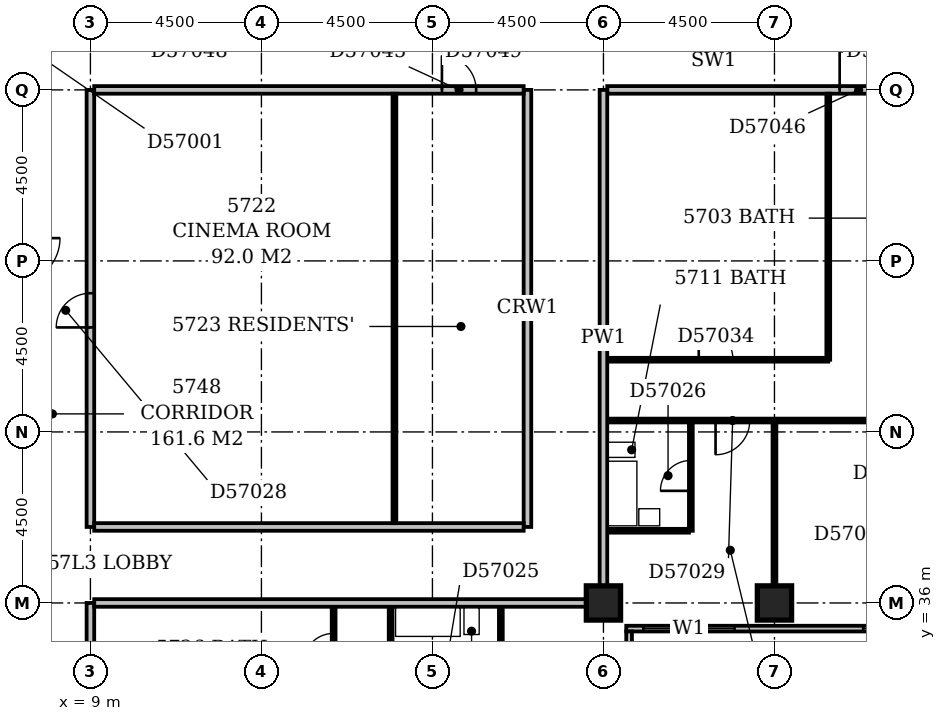
"""IFC4 building model, lengths in metres.
Left out: names, types, materials, properties, quantities, classifications, styles, units other than length and angle.
Written with IfcOpenShell. Run it as: python <this file> out.ifc"""

import sys

from ifc_helpers import new_model, si_unit, direction, frame, frame_2d, origin, origin_2d, place, context, subcontext, project, spatial, rectangle, extrude, element, fill, save


model = new_model("IFC4")
c1 = context("Model", 3, precision=1e-05, world=origin(), true_north=direction((0.0, 1.0)))
c2 = subcontext(c1, "Body", "Model", "MODEL_VIEW")
j1 = project(units=[si_unit("LENGTHUNIT", "METRE"), si_unit("PLANEANGLEUNIT", "RADIAN")], contexts=[c1])
p1 = place(None, origin())
s1 = spatial("IfcSite", under=j1, at=p1, CompositionType="ELEMENT")
p2 = place(p1, origin())
s2 = spatial("IfcBuilding", under=s1, at=p2, CompositionType="ELEMENT")
p3 = place(p2, frame((0.0, 0.0, 222.2)))
s3 = spatial("IfcBuildingStorey", under=s2, at=p3, CompositionType="ELEMENT", Elevation=222.2)
for number, where, z_axis, x_axis in (
    (1, (22.5, 36.0, -0.3), (0.0, 0.0, 1.0), (1.0, 0.0, 0.0)),
    (2, (27.0, 36.0, -0.3), (0.0, 0.0, 1.0), (1.0, 0.0, 0.0)),
):
    element("IfcColumn", number, at=place(p3, frame(where, z_axis=z_axis, x_axis=x_axis)), inside=s3, PredefinedType="COLUMN", context=c2, shape_type="SweptSolid", body=[
        extrude(rectangle(XDim=0.9, YDim=0.9, at=origin_2d()), origin(), (0.0, 0.0, 1.0), 3.6),
    ])
p4 = place(p3, frame((23.175, 17.4, 0.0), z_axis=(0.0, 0.0, 1.0), x_axis=(0.0, 1.0, 0.0)))
e3 = element("IfcWall", 3, at=p4, inside=s3, PredefinedType="STANDARD", context=c2, shape_type="SweptSolid", body=[
    extrude(rectangle(XDim=17.85, YDim=0.15, at=frame_2d((8.925, 0.0))), origin(), (0.0, 0.0, 1.0), 2.7),
])
p5 = place(p4, frame((1.65, 0.0, 0.6)))
e4 = element("IfcOpeningElement", 4, at=p5, cuts=e3, PredefinedType="OPENING", context=c2, shape_type="SweptSolid", body=[
    extrude(rectangle(XDim=2.4, YDim=1.8, at=frame_2d((1.2, 0.9))), frame((0.0, 0.087, 0.0), z_axis=(0.0, -1.0, 0.0), x_axis=(1.0, 0.0, 0.0)), (0.0, 0.0, 1.0), 0.174),
])
p6 = place(p4, frame((5.798, 0.0, 0.6)))
e5 = element("IfcOpeningElement", 5, at=p6, cuts=e3, PredefinedType="OPENING", context=c2, shape_type="SweptSolid", body=[
    extrude(rectangle(XDim=0.6, YDim=1.8, at=frame_2d((0.3, 0.9))), frame((0.0, 0.087, 0.0), z_axis=(0.0, -1.0, 0.0), x_axis=(1.0, 0.0, 0.0)), (0.0, 0.0, 1.0), 0.174),
])
p7 = place(p4, frame((8.491, 0.0, 0.6)))
e6 = element("IfcOpeningElement", 6, at=p7, cuts=e3, PredefinedType="OPENING", context=c2, shape_type="SweptSolid", body=[
    extrude(rectangle(XDim=0.45, YDim=1.8, at=frame_2d((0.225, 0.9))), frame((0.0, 0.087, 0.0), z_axis=(0.0, -1.0, 0.0), x_axis=(1.0, 0.0, 0.0)), (0.0, 0.0, 1.0), 0.174),
])
p8 = place(p4, frame((10.65, 0.0, 0.6)))
e7 = element("IfcOpeningElement", 7, at=p8, cuts=e3, PredefinedType="OPENING", context=c2, shape_type="SweptSolid", body=[
    extrude(rectangle(XDim=2.4, YDim=1.8, at=frame_2d((1.2, 0.9))), frame((0.0, 0.087, 0.0), z_axis=(0.0, -1.0, 0.0), x_axis=(1.0, 0.0, 0.0)), (0.0, 0.0, 1.0), 0.174),
])
p9 = place(p4, frame((15.15, 0.0, 0.6)))
e8 = element("IfcOpeningElement", 8, at=p9, cuts=e3, PredefinedType="OPENING", context=c2, shape_type="SweptSolid", body=[
    extrude(rectangle(XDim=2.4, YDim=1.8, at=frame_2d((1.2, 0.9))), frame((0.0, 0.087, 0.0), z_axis=(0.0, -1.0, 0.0), x_axis=(1.0, 0.0, 0.0)), (0.0, 0.0, 1.0), 0.174),
])
p10 = place(p3, frame((23.1, 35.325, 0.0), z_axis=(0.0, 0.0, 1.0), x_axis=(1.0, 0.0, 0.0)))
e9 = element("IfcWall", 9, at=p10, inside=s3, PredefinedType="STANDARD", context=c2, shape_type="SweptSolid", body=[
    extrude(rectangle(XDim=27.15, YDim=0.15, at=frame_2d((13.575, 0.0))), origin(), (0.0, 0.0, 1.0), 2.7),
])
p11 = place(p10, frame((0.45, 0.0, 0.6)))
e10 = element("IfcOpeningElement", 10, at=p11, cuts=e9, PredefinedType="OPENING", context=c2, shape_type="SweptSolid", body=[
    extrude(rectangle(XDim=2.4, YDim=1.8, at=frame_2d((1.2, 0.9))), frame((0.0, 0.087, 0.0), z_axis=(0.0, -1.0, 0.0), x_axis=(1.0, 0.0, 0.0)), (0.0, 0.0, 1.0), 0.174),
])
p12 = place(p10, frame((6.234, 0.0, 0.6)))
e11 = element("IfcOpeningElement", 11, at=p12, cuts=e9, PredefinedType="OPENING", context=c2, shape_type="SweptSolid", body=[
    extrude(rectangle(XDim=1.5, YDim=1.8, at=frame_2d((0.75, 0.9))), frame((0.0, 0.087, 0.0), z_axis=(0.0, -1.0, 0.0), x_axis=(1.0, 0.0, 0.0)), (0.0, 0.0, 1.0), 0.174),
])
p13 = place(p10, frame((9.45, 0.0, 0.6)))
e12 = element("IfcOpeningElement", 12, at=p13, cuts=e9, PredefinedType="OPENING", context=c2, shape_type="SweptSolid", body=[
    extrude(rectangle(XDim=2.4, YDim=1.8, at=frame_2d((1.2, 0.9))), frame((0.0, 0.087, 0.0), z_axis=(0.0, -1.0, 0.0), x_axis=(1.0, 0.0, 0.0)), (0.0, 0.0, 1.0), 0.174),
])
p14 = place(p10, frame((13.95, 0.0, 0.6)))
e13 = element("IfcOpeningElement", 13, at=p14, cuts=e9, PredefinedType="OPENING", context=c2, shape_type="SweptSolid", body=[
    extrude(rectangle(XDim=2.4, YDim=1.8, at=frame_2d((1.2, 0.9))), frame((0.0, 0.087, 0.0), z_axis=(0.0, -1.0, 0.0), x_axis=(1.0, 0.0, 0.0)), (0.0, 0.0, 1.0), 0.174),
])
p15 = place(p10, frame((18.18, 0.0, 0.6)))
e14 = element("IfcOpeningElement", 14, at=p15, cuts=e9, PredefinedType="OPENING", context=c2, shape_type="SweptSolid", body=[
    extrude(rectangle(XDim=1.8, YDim=1.8, at=frame_2d((0.9, 0.9))), frame((0.0, 0.087, 0.0), z_axis=(0.0, -1.0, 0.0), x_axis=(1.0, 0.0, 0.0)), (0.0, 0.0, 1.0), 0.174),
])
p16 = place(p10, frame((22.95, 0.0, 0.6)))
e15 = element("IfcOpeningElement", 15, at=p16, cuts=e9, PredefinedType="OPENING", context=c2, shape_type="SweptSolid", body=[
    extrude(rectangle(XDim=2.4, YDim=1.8, at=frame_2d((1.2, 0.9))), frame((0.0, 0.087, 0.0), z_axis=(0.0, -1.0, 0.0), x_axis=(1.0, 0.0, 0.0)), (0.0, 0.0, 1.0), 0.174),
])
p17 = place(p3, frame((9.0, 18.45, 0.0), z_axis=(0.0, 0.0, 1.0), x_axis=(0.0, 1.0, 0.0)))
e16 = element("IfcWall", 16, at=p17, inside=s3, PredefinedType="PARTITIONING", context=c2, shape_type="SweptSolid", body=[
    extrude(rectangle(XDim=17.55, YDim=0.2, at=frame_2d((8.775, 0.0))), origin(), (0.0, 0.0, 1.0), 3.3),
])
p18 = place(p17, frame((13.85, 0.0, 0.0)))
e17 = element("IfcOpeningElement", 17, at=p18, cuts=e16, PredefinedType="OPENING", context=c2, shape_type="SweptSolid", body=[
    extrude(rectangle(XDim=1.0, YDim=2.1, at=frame_2d((0.5, 1.05))), frame((0.0, 0.112, 0.0), z_axis=(0.0, -1.0, 0.0), x_axis=(1.0, 0.0, 0.0)), (0.0, 0.0, 1.0), 0.224),
])
p19 = place(p17, frame((3.25, 0.0, 0.0)))
e18 = element("IfcOpeningElement", 18, at=p19, cuts=e16, PredefinedType="OPENING", context=c2, shape_type="SweptSolid", body=[
    extrude(rectangle(XDim=1.0, YDim=2.1, at=frame_2d((0.5, 1.05))), frame((0.0, 0.112, 0.0), z_axis=(0.0, -1.0, 0.0), x_axis=(1.0, 0.0, 0.0)), (0.0, 0.0, 1.0), 0.224),
])
p20 = place(p3, frame((16.9, 27.1, 0.0), z_axis=(0.0, 0.0, 1.0), x_axis=(0.0, 1.0, 0.0)))
e19 = element("IfcWall", 19, at=p20, inside=s3, PredefinedType="PARTITIONING", context=c2, shape_type="SweptSolid", body=[
    extrude(rectangle(XDim=8.8, YDim=0.1, at=frame_2d((4.4, 0.0))), origin(), (0.0, 0.0, 1.0), 3.3),
])
p21 = place(p20, frame((1.7, 0.0, 0.0)))
e20 = element("IfcOpeningElement", 20, at=p21, cuts=e19, PredefinedType="OPENING", context=c2, shape_type="SweptSolid", body=[
    extrude(rectangle(XDim=0.9, YDim=2.1, at=frame_2d((0.45, 1.05))), frame((0.0, 0.062, 0.0), z_axis=(0.0, -1.0, 0.0), x_axis=(1.0, 0.0, 0.0)), (0.0, 0.0, 1.0), 0.124),
])
p22 = place(p20, frame((5.05, 0.0, 0.0)))
e21 = element("IfcOpeningElement", 21, at=p22, cuts=e19, PredefinedType="OPENING", context=c2, shape_type="SweptSolid", body=[
    extrude(rectangle(XDim=0.9, YDim=2.1, at=frame_2d((0.45, 1.05))), frame((0.0, 0.062, 0.0), z_axis=(0.0, -1.0, 0.0), x_axis=(1.0, 0.0, 0.0)), (0.0, 0.0, 1.0), 0.124),
])
p23 = place(p3, frame((15.4, 33.6, 0.0), z_axis=(0.0, 0.0, 1.0), x_axis=(0.0, 1.0, 0.0)))
e22 = element("IfcWall", 22, at=p23, inside=s3, PredefinedType="PARTITIONING", context=c2, shape_type="SweptSolid", body=[
    extrude(rectangle(XDim=2.3, YDim=0.1, at=frame_2d((1.15, 0.0))), origin(), (0.0, 0.0, 1.0), 3.3),
])
p24 = place(p23, frame((0.8, 0.0, 0.0)))
e23 = element("IfcOpeningElement", 23, at=p24, cuts=e22, PredefinedType="OPENING", context=c2, shape_type="SweptSolid", body=[
    extrude(rectangle(XDim=0.8, YDim=2.1, at=frame_2d((0.4, 1.05))), frame((0.0, 0.062, 0.0), z_axis=(0.0, -1.0, 0.0), x_axis=(1.0, 0.0, 0.0)), (0.0, 0.0, 1.0), 0.124),
])
p25 = place(p3, frame((19.8, 33.7, 0.0), z_axis=(0.0, 0.0, 1.0), x_axis=(0.0, 1.0, 0.0)))
e24 = element("IfcWall", 24, at=p25, inside=s3, PredefinedType="PLUMBINGWALL", context=c2, shape_type="SweptSolid", body=[
    extrude(rectangle(XDim=2.2, YDim=0.1, at=frame_2d((1.1, 0.0))), origin(), (0.0, 0.0, 1.0), 3.3),
])
p26 = place(p3, frame((9.1, 36.0, 0.0), z_axis=(0.0, 0.0, 1.0), x_axis=(1.0, 0.0, 0.0)))
e25 = element("IfcWall", 25, at=p26, inside=s3, PredefinedType="PARTITIONING", context=c2, shape_type="SweptSolid", body=[
    extrude(rectangle(XDim=12.95, YDim=0.2, at=frame_2d((6.475, 0.0))), origin(), (0.0, 0.0, 1.0), 3.3),
])
p27 = place(p3, frame((22.5, 36.45, 0.0), z_axis=(0.0, 0.0, 1.0), x_axis=(0.0, 1.0, 0.0)))
e26 = element("IfcWall", 26, at=p27, inside=s3, PredefinedType="PARTITIONING", context=c2, shape_type="SweptSolid", body=[
    extrude(rectangle(XDim=13.05, YDim=0.2, at=frame_2d((6.525, 0.0))), origin(), (0.0, 0.0, 1.0), 3.3),
])
p28 = place(p3, frame((27.0, 36.45, 0.0), z_axis=(0.0, 0.0, 1.0), x_axis=(0.0, 1.0, 0.0)))
e27 = element("IfcWall", 27, at=p28, inside=s3, PredefinedType="PARTITIONING", context=c2, shape_type="SweptSolid", body=[
    extrude(rectangle(XDim=4.3, YDim=0.1, at=frame_2d((2.15, 0.0))), origin(), (0.0, 0.0, 1.0), 2.4),
])
p29 = place(p3, frame((22.6, 37.9, 0.0), z_axis=(0.0, 0.0, 1.0), x_axis=(1.0, 0.0, 0.0)))
e28 = element("IfcWall", 28, at=p29, inside=s3, PredefinedType="PLUMBINGWALL", context=c2, shape_type="SweptSolid", body=[
    extrude(rectangle(XDim=2.15, YDim=0.1, at=frame_2d((1.075, 0.0))), origin(), (0.0, 0.0, 1.0), 3.3),
])
p30 = place(p3, frame((24.8, 37.9, 0.0), z_axis=(0.0, 0.0, 1.0), x_axis=(0.0, 1.0, 0.0)))
e29 = element("IfcWall", 29, at=p30, inside=s3, PredefinedType="PLUMBINGWALL", context=c2, shape_type="SweptSolid", body=[
    extrude(rectangle(XDim=2.85, YDim=0.1, at=frame_2d((1.425, 0.0))), origin(), (0.0, 0.0, 1.0), 3.3),
])
p31 = place(p30, frame((1.05, 0.0, 0.0)))
e30 = element("IfcOpeningElement", 30, at=p31, cuts=e29, PredefinedType="OPENING", context=c2, shape_type="SweptSolid", body=[
    extrude(rectangle(XDim=0.8, YDim=2.1, at=frame_2d((0.4, 1.05))), frame((0.0, 0.062, 0.0), z_axis=(0.0, -1.0, 0.0), x_axis=(1.0, 0.0, 0.0)), (0.0, 0.0, 1.0), 0.124),
])
p32 = place(p3, frame((9.0, 38.0, 0.0), z_axis=(0.0, 0.0, 1.0), x_axis=(0.0, 1.0, 0.0)))
e31 = element("IfcWall", 31, at=p32, inside=s3, PredefinedType="PARTITIONING", context=c2, shape_type="SweptSolid", body=[
    extrude(rectangle(XDim=11.5, YDim=0.2, at=frame_2d((5.75, 0.0))), origin(), (0.0, 0.0, 1.0), 3.3),
])
p33 = place(p32, frame((5.25, 0.0, 0.0)))
e32 = element("IfcOpeningElement", 32, at=p33, cuts=e31, PredefinedType="OPENING", context=c2, shape_type="SweptSolid", body=[
    extrude(rectangle(XDim=0.9, YDim=2.1, at=frame_2d((0.45, 1.05))), frame((0.0, 0.112, 0.0), z_axis=(0.0, -1.0, 0.0), x_axis=(1.0, 0.0, 0.0)), (0.0, 0.0, 1.0), 0.224),
])
p34 = place(p3, frame((9.1, 38.0, 0.0), z_axis=(0.0, 0.0, 1.0), x_axis=(1.0, 0.0, 0.0)))
e33 = element("IfcWall", 33, at=p34, inside=s3, PredefinedType="PARTITIONING", context=c2, shape_type="SweptSolid", body=[
    extrude(rectangle(XDim=11.3, YDim=0.2, at=frame_2d((5.65, 0.0))), origin(), (0.0, 0.0, 1.0), 3.3),
])
p35 = place(p3, frame((20.5, 38.0, 0.0), z_axis=(0.0, 0.0, 1.0), x_axis=(0.0, 1.0, 0.0)))
e34 = element("IfcWall", 34, at=p35, inside=s3, PredefinedType="PARTITIONING", context=c2, shape_type="SweptSolid", body=[
    extrude(rectangle(XDim=11.5, YDim=0.2, at=frame_2d((5.75, 0.0))), origin(), (0.0, 0.0, 1.0), 3.3),
])
p36 = place(p3, frame((17.0, 38.1, 0.0), z_axis=(0.0, 0.0, 1.0), x_axis=(0.0, 1.0, 0.0)))
e35 = element("IfcWall", 35, at=p36, inside=s3, PredefinedType="PARTITIONING", context=c2, shape_type="SweptSolid", body=[
    extrude(rectangle(XDim=11.3, YDim=0.1, at=frame_2d((5.65, 0.0))), origin(), (0.0, 0.0, 1.0), 3.3),
])
p37 = place(p3, frame((22.6, 40.8, 0.0), z_axis=(0.0, 0.0, 1.0), x_axis=(1.0, 0.0, 0.0)))
e36 = element("IfcWall", 36, at=p37, inside=s3, PredefinedType="PARTITIONING", context=c2, shape_type="SweptSolid", body=[
    extrude(rectangle(XDim=22.3, YDim=0.1, at=frame_2d((11.15, 0.0))), origin(), (0.0, 0.0, 1.0), 3.3),
])
p38 = place(p37, frame((2.85, 0.0, 0.0)))
e37 = element("IfcOpeningElement", 37, at=p38, cuts=e36, PredefinedType="OPENING", context=c2, shape_type="SweptSolid", body=[
    extrude(rectangle(XDim=0.9, YDim=2.1, at=frame_2d((0.45, 1.05))), frame((0.0, 0.062, 0.0), z_axis=(0.0, -1.0, 0.0), x_axis=(1.0, 0.0, 0.0)), (0.0, 0.0, 1.0), 0.124),
])
p39 = place(p37, frame((8.4, 0.0, 0.0)))
e38 = element("IfcOpeningElement", 38, at=p39, cuts=e36, PredefinedType="OPENING", context=c2, shape_type="SweptSolid", body=[
    extrude(rectangle(XDim=0.9, YDim=2.1, at=frame_2d((0.45, 1.05))), frame((0.0, 0.062, 0.0), z_axis=(0.0, -1.0, 0.0), x_axis=(1.0, 0.0, 0.0)), (0.0, 0.0, 1.0), 0.124),
])
p40 = place(p37, frame((14.05, 0.0, 0.0)))
e39 = element("IfcOpeningElement", 39, at=p40, cuts=e36, PredefinedType="OPENING", context=c2, shape_type="SweptSolid", body=[
    extrude(rectangle(XDim=0.9, YDim=2.1, at=frame_2d((0.45, 1.05))), frame((0.0, 0.062, 0.0), z_axis=(0.0, -1.0, 0.0), x_axis=(1.0, 0.0, 0.0)), (0.0, 0.0, 1.0), 0.124),
])
p41 = place(p37, frame((19.7, 0.0, 0.0)))
e40 = element("IfcOpeningElement", 40, at=p41, cuts=e36, PredefinedType="OPENING", context=c2, shape_type="SweptSolid", body=[
    extrude(rectangle(XDim=0.9, YDim=2.1, at=frame_2d((0.45, 1.05))), frame((0.0, 0.062, 0.0), z_axis=(0.0, -1.0, 0.0), x_axis=(1.0, 0.0, 0.0)), (0.0, 0.0, 1.0), 0.124),
])
p42 = place(p3, frame((22.6, 42.4, 0.0), z_axis=(0.0, 0.0, 1.0), x_axis=(1.0, 0.0, 0.0)))
e41 = element("IfcWall", 41, at=p42, inside=s3, PredefinedType="PARTITIONING", context=c2, shape_type="SweptSolid", body=[
    extrude(rectangle(XDim=5.815, YDim=0.1, at=frame_2d((2.908, 0.0))), origin(), (0.0, 0.0, 1.0), 3.3),
])
p43 = place(p42, frame((2.408, 0.0, 0.0)))
e42 = element("IfcOpeningElement", 42, at=p43, cuts=e41, PredefinedType="OPENING", context=c2, shape_type="SweptSolid", body=[
    extrude(rectangle(XDim=0.9, YDim=2.1, at=frame_2d((0.45, 1.05))), frame((0.0, 0.062, 0.0), z_axis=(0.0, -1.0, 0.0), x_axis=(1.0, 0.0, 0.0)), (0.0, 0.0, 1.0), 0.124),
])
p44 = place(p3, frame((28.416, 42.4, 0.0), z_axis=(0.0, 0.0, 1.0), x_axis=(0.0, 1.0, 0.0)))
e43 = element("IfcWall", 43, at=p44, inside=s3, PredefinedType="PARTITIONING", context=c2, shape_type="SweptSolid", body=[
    extrude(rectangle(XDim=7.0, YDim=0.1, at=frame_2d((3.5, 0.0))), origin(), (0.0, 0.0, 1.0), 3.3),
])
p45 = place(p3, frame((9.1, 49.5, 0.0), z_axis=(0.0, 0.0, 1.0), x_axis=(1.0, 0.0, 0.0)))
e44 = element("IfcWall", 44, at=p45, inside=s3, PredefinedType="PARTITIONING", context=c2, shape_type="SweptSolid", body=[
    extrude(rectangle(XDim=11.3, YDim=0.2, at=frame_2d((5.65, 0.0))), origin(), (0.0, 0.0, 1.0), 3.3),
])
p46 = place(p45, frame((9.15, 0.0, 0.0)))
e45 = element("IfcOpeningElement", 45, at=p46, cuts=e44, PredefinedType="OPENING", context=c2, shape_type="SweptSolid", body=[
    extrude(rectangle(XDim=0.9, YDim=2.1, at=frame_2d((0.45, 1.05))), frame((0.0, 0.112, 0.0), z_axis=(0.0, -1.0, 0.0), x_axis=(1.0, 0.0, 0.0)), (0.0, 0.0, 1.0), 0.224),
])
p47 = place(p3, frame((22.6, 49.5, 0.0), z_axis=(0.0, 0.0, 1.0), x_axis=(1.0, 0.0, 0.0)))
e46 = element("IfcWall", 46, at=p47, inside=s3, PredefinedType="PARTITIONING", context=c2, shape_type="SweptSolid", body=[
    extrude(rectangle(XDim=30.95, YDim=0.2, at=frame_2d((15.475, 0.0))), origin(), (0.0, 0.0, 1.0), 3.3),
])
p48 = place(p47, frame((6.115, 0.0, 0.0)))
e47 = element("IfcOpeningElement", 47, at=p48, cuts=e46, PredefinedType="OPENING", context=c2, shape_type="SweptSolid", body=[
    extrude(rectangle(XDim=1.0, YDim=2.1, at=frame_2d((0.5, 1.05))), frame((0.0, 0.112, 0.0), z_axis=(0.0, -1.0, 0.0), x_axis=(1.0, 0.0, 0.0)), (0.0, 0.0, 1.0), 0.224),
])
p49 = place(p47, frame((22.7, 0.0, 0.0)))
e48 = element("IfcOpeningElement", 48, at=p49, cuts=e46, PredefinedType="OPENING", context=c2, shape_type="SweptSolid", body=[
    extrude(rectangle(XDim=1.0, YDim=2.1, at=frame_2d((0.5, 1.05))), frame((0.0, 0.112, 0.0), z_axis=(0.0, -1.0, 0.0), x_axis=(1.0, 0.0, 0.0)), (0.0, 0.0, 1.0), 0.224),
])
p50 = place(p11, origin())
e49 = element("IfcWindow", 49, at=p50, inside=s3, PartitioningType="SINGLE_PANEL", PredefinedType="WINDOW", context=c2, shape_type="SweptSolid", body=[
    extrude(rectangle(XDim=2.4, YDim=1.8, at=frame_2d((1.2, 0.9))), frame((0.0, 0.03, 0.0), z_axis=(0.0, -1.0, 0.0), x_axis=(1.0, 0.0, 0.0)), (0.0, 0.0, 1.0), 0.06),
])
fill(e10, e49)
p51 = place(p12, origin())
e50 = element("IfcWindow", 50, at=p51, inside=s3, PartitioningType="SINGLE_PANEL", PredefinedType="WINDOW", context=c2, shape_type="SweptSolid", body=[
    extrude(rectangle(XDim=1.5, YDim=1.8, at=frame_2d((0.75, 0.9))), frame((0.0, 0.03, 0.0), z_axis=(0.0, -1.0, 0.0), x_axis=(1.0, 0.0, 0.0)), (0.0, 0.0, 1.0), 0.06),
])
fill(e11, e50)
p52 = place(p24, origin())
e51 = element("IfcDoor", 51, at=p52, inside=s3, OperationType="SINGLE_SWING_LEFT", PredefinedType="DOOR", context=c2, shape_type="SweptSolid", body=[
    extrude(rectangle(XDim=0.8, YDim=2.1, at=frame_2d((0.4, 1.05))), frame((0.0, 0.025, 0.0), z_axis=(0.0, -1.0, 0.0), x_axis=(1.0, 0.0, 0.0)), (0.0, 0.0, 1.0), 0.05),
])
fill(e23, e51)
p53 = place(p31, origin())
e52 = element("IfcDoor", 52, at=p53, inside=s3, OperationType="SINGLE_SWING_LEFT", PredefinedType="DOOR", context=c2, shape_type="SweptSolid", body=[
    extrude(rectangle(XDim=0.8, YDim=2.1, at=frame_2d((0.4, 1.05))), frame((0.0, 0.025, 0.0), z_axis=(0.0, -1.0, 0.0), x_axis=(1.0, 0.0, 0.0)), (0.0, 0.0, 1.0), 0.05),
])
fill(e30, e52)
p54 = place(p33, origin())
e53 = element("IfcDoor", 53, at=p54, inside=s3, OperationType="SINGLE_SWING_LEFT", PredefinedType="DOOR", context=c2, shape_type="SweptSolid", body=[
    extrude(rectangle(XDim=0.9, YDim=2.1, at=frame_2d((0.45, 1.05))), frame((0.0, 0.025, 0.0), z_axis=(0.0, -1.0, 0.0), x_axis=(1.0, 0.0, 0.0)), (0.0, 0.0, 1.0), 0.05),
])
fill(e32, e53)
p55 = place(p38, frame((0.9, 0.0, 0.0), z_axis=(0.0, 0.0, 1.0), x_axis=(-1.0, 0.0, 0.0)))
e54 = element("IfcDoor", 54, at=p55, inside=s3, OperationType="SINGLE_SWING_RIGHT", PredefinedType="DOOR", context=c2, shape_type="SweptSolid", body=[
    extrude(rectangle(XDim=0.9, YDim=2.1, at=frame_2d((0.45, 1.05))), frame((0.0, 0.025, 0.0), z_axis=(0.0, -1.0, 0.0), x_axis=(1.0, 0.0, 0.0)), (0.0, 0.0, 1.0), 0.05),
])
fill(e37, e54)
p56 = place(p43, origin())
e55 = element("IfcDoor", 55, at=p56, inside=s3, OperationType="SINGLE_SWING_LEFT", PredefinedType="DOOR", context=c2, shape_type="SweptSolid", body=[
    extrude(rectangle(XDim=0.9, YDim=2.1, at=frame_2d((0.45, 1.05))), frame((0.0, 0.025, 0.0), z_axis=(0.0, -1.0, 0.0), x_axis=(1.0, 0.0, 0.0)), (0.0, 0.0, 1.0), 0.05),
])
fill(e42, e55)
p57 = place(p46, origin())
e56 = element("IfcDoor", 56, at=p57, inside=s3, OperationType="SINGLE_SWING_LEFT", PredefinedType="DOOR", context=c2, shape_type="SweptSolid", body=[
    extrude(rectangle(XDim=0.9, YDim=2.1, at=frame_2d((0.45, 1.05))), frame((0.0, 0.025, 0.0), z_axis=(0.0, -1.0, 0.0), x_axis=(1.0, 0.0, 0.0)), (0.0, 0.0, 1.0), 0.05),
])
fill(e45, e56)
p58 = place(p48, origin())
e57 = element("IfcDoor", 57, at=p58, inside=s3, OperationType="SINGLE_SWING_LEFT", PredefinedType="DOOR", context=c2, shape_type="SweptSolid", body=[
    extrude(rectangle(XDim=1.0, YDim=2.1, at=frame_2d((0.5, 1.05))), frame((0.0, 0.025, 0.0), z_axis=(0.0, -1.0, 0.0), x_axis=(1.0, 0.0, 0.0)), (0.0, 0.0, 1.0), 0.05),
])
fill(e47, e57)
save(model, sys.argv[1])
